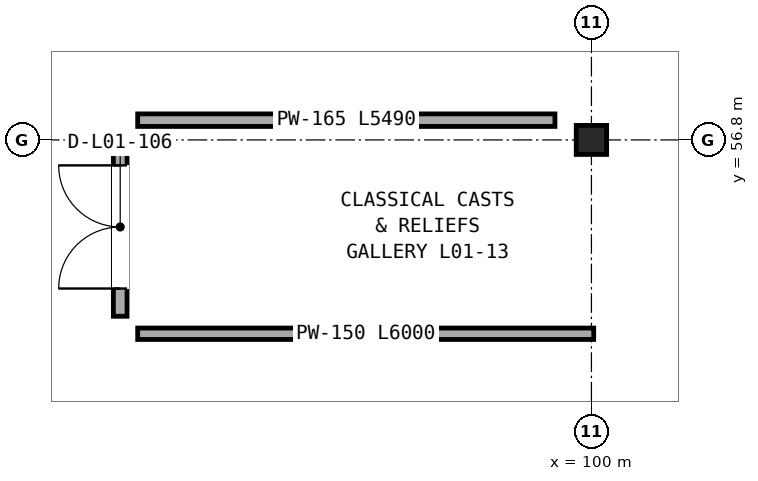
"""IFC4 building model, lengths in metres.
Left out: names, types, materials, properties, quantities, classifications, styles, units other than length and angle.
Written with IfcOpenShell. Run it as: python <this file> out.ifc"""

import sys

from ifc_helpers import new_model, si_unit, direction, frame, frame_2d, origin, origin_2d, place, context, subcontext, project, spatial, rectangle, i_section, extrude, element, fill, save


model = new_model("IFC4")
c1 = context("Model", 3, precision=1e-05, world=origin(), true_north=direction((0.0, 1.0)))
c2 = subcontext(c1, "Body", "Model", "MODEL_VIEW")
j1 = project(units=[si_unit("LENGTHUNIT", "METRE"), si_unit("PLANEANGLEUNIT", "RADIAN")], contexts=[c1])
p1 = place(None, origin())
s1 = spatial("IfcSite", under=j1, at=p1, CompositionType="ELEMENT")
p2 = place(p1, origin())
s2 = spatial("IfcBuilding", under=s1, at=p2, CompositionType="ELEMENT")
p3 = place(p2, frame((0.0, 0.0, 5.6)))
s3 = spatial("IfcBuildingStorey", under=s2, at=p3, CompositionType="ELEMENT", Elevation=5.6)
p4 = place(p3, frame((100.0, 56.8, 0.0), z_axis=(0.0, 0.0, 1.0), x_axis=(1.0, 0.0, 0.0)))
e1 = element("IfcColumn", 1, at=p4, inside=s3, PredefinedType="COLUMN", context=c2, shape_type="SweptSolid", body=[
    extrude(i_section(OverallWidth=0.4, OverallDepth=0.382, WebThickness=0.025, FlangeThickness=0.036, at=origin_2d()), origin(), (0.0, 0.0, 1.0), 4.5),
])
p5 = place(p3, frame((93.8, 54.48, 0.0), z_axis=(0.0, 0.0, 1.0), x_axis=(0.0, 1.0, 0.0)))
e2 = element("IfcWall", 2, at=p5, inside=s3, PredefinedType="PARTITIONING", context=c2, shape_type="SweptSolid", body=[
    extrude(rectangle(XDim=2.35, YDim=0.18, at=frame_2d((1.175, 0.0))), origin(), (0.0, 0.0, 1.0), 3.613),
])
p6 = place(p5, frame((0.365, 0.0, 0.0)))
e3 = element("IfcOpeningElement", 3, at=p6, cuts=e2, PredefinedType="OPENING", context=c2, shape_type="SweptSolid", body=[
    extrude(rectangle(XDim=1.62, YDim=2.46, at=frame_2d((0.81, 1.23))), frame((0.0, 0.1, 0.0), z_axis=(0.0, -1.0, 0.0), x_axis=(1.0, 0.0, 0.0)), (0.0, 0.0, 1.0), 0.2),
])
p7 = place(p3, frame((94.03, 57.06, 0.0), z_axis=(0.0, 0.0, 1.0), x_axis=(1.0, 0.0, 0.0)))
e4 = element("IfcWall", 4, at=p7, inside=s3, PredefinedType="PARTITIONING", context=c2, shape_type="SweptSolid", body=[
    extrude(rectangle(XDim=5.49, YDim=0.165, at=frame_2d((2.745, 0.0))), origin(), (0.0, 0.0, 1.0), 3.613),
])
p8 = place(p3, frame((100.03, 54.25, 0.0), z_axis=(0.0, 0.0, 1.0), x_axis=(-1.0, 0.0, 0.0)))
e5 = element("IfcWall", 5, at=p8, inside=s3, PredefinedType="PARTITIONING", context=c2, shape_type="SweptSolid", body=[
    extrude(rectangle(XDim=6.0, YDim=0.15, at=frame_2d((3.0, 0.0))), origin(), (0.0, 0.0, 1.0), 3.763),
])
p9 = place(p6, origin())
e6 = element("IfcDoor", 6, at=p9, inside=s3, OperationType="DOUBLE_DOOR_SINGLE_SWING", PredefinedType="DOOR", context=c2, shape_type="SweptSolid", body=[
    extrude(rectangle(XDim=1.62, YDim=2.46, at=frame_2d((0.81, 1.23))), frame((0.0, 0.025, 0.0), z_axis=(0.0, -1.0, 0.0), x_axis=(1.0, 0.0, 0.0)), (0.0, 0.0, 1.0), 0.05),
])
fill(e3, e6)
save(model, sys.argv[1])
